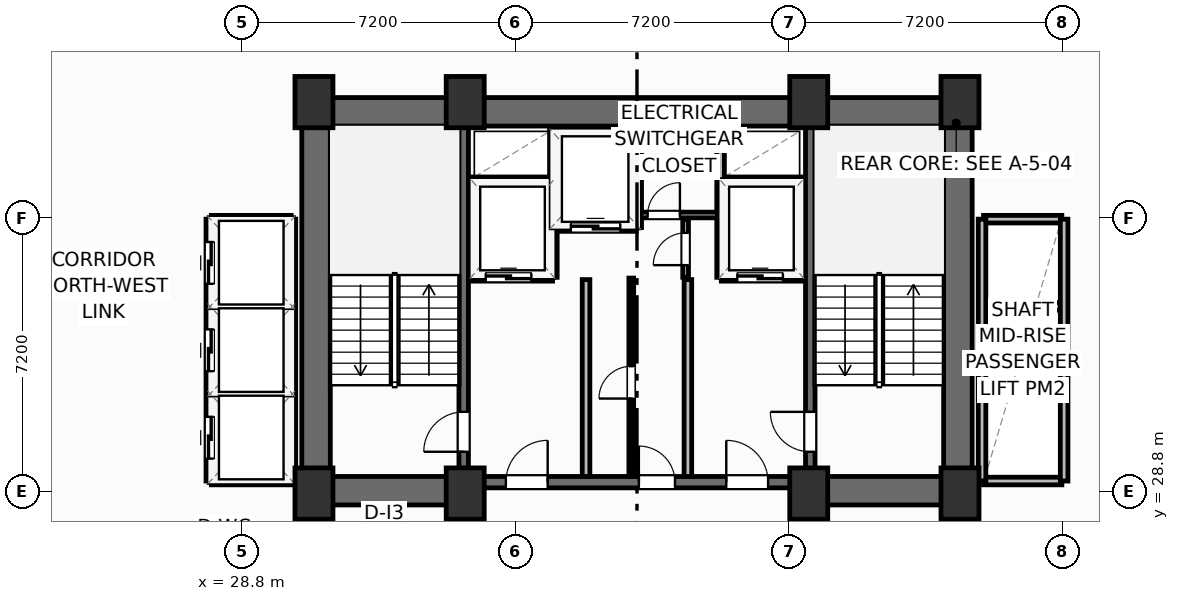
"""IFC4 building model, lengths in metres.
Left out: names, types, materials, properties, quantities, classifications, styles, units other than length and angle.
Written with IfcOpenShell. Run it as: python <this file> out.ifc"""

import sys

from ifc_helpers import new_model, si_unit, direction, frame, frame_2d, origin, origin_2d, place, context, subcontext, project, spatial, rectangle, extrude, element, fill, save


model = new_model("IFC4")
c1 = context("Model", 3, precision=1e-05, world=origin(), true_north=direction((0.0, 1.0)))
c2 = subcontext(c1, "Body", "Model", "MODEL_VIEW")
j1 = project(units=[si_unit("LENGTHUNIT", "METRE"), si_unit("PLANEANGLEUNIT", "RADIAN")], contexts=[c1])
p1 = place(None, origin())
s1 = spatial("IfcSite", under=j1, at=p1, CompositionType="ELEMENT")
p2 = place(p1, origin())
s2 = spatial("IfcBuilding", under=s1, at=p2, CompositionType="ELEMENT")
p3 = place(p2, frame((0.0, 0.0, 79.9)))
s3 = spatial("IfcBuildingStorey", under=s2, at=p3, CompositionType="ELEMENT", Elevation=79.9)
for number, where, z_axis, x_axis in (
    (1, (30.7, 28.75, 0.0), (0.0, 0.0, 1.0), (1.0, 0.0, 0.0)),
    (2, (34.68, 28.75, 0.0), (0.0, 0.0, 1.0), (1.0, 0.0, 0.0)),
    (3, (43.72, 28.75, 0.0), (0.0, 0.0, 1.0), (1.0, 0.0, 0.0)),
    (4, (47.7, 28.75, 0.0), (0.0, 0.0, 1.0), (1.0, 0.0, 0.0)),
    (5, (30.7, 39.05, 0.0), (0.0, 0.0, 1.0), (1.0, 0.0, 0.0)),
    (6, (34.68, 39.05, 0.0), (0.0, 0.0, 1.0), (1.0, 0.0, 0.0)),
    (7, (43.72, 39.05, 0.0), (0.0, 0.0, 1.0), (1.0, 0.0, 0.0)),
    (8, (47.7, 39.05, 0.0), (0.0, 0.0, 1.0), (1.0, 0.0, 0.0)),
):
    element("IfcColumn", number, at=place(p3, frame(where, z_axis=z_axis, x_axis=x_axis)), inside=s3, PredefinedType="COLUMN", context=c2, shape_type="SweptSolid", body=[
        extrude(rectangle(XDim=1.0, YDim=1.35, at=origin_2d()), origin(), (0.0, 0.0, 1.0), 3.7),
    ])
p4 = place(p3, frame((30.38, 38.795, 0.0), z_axis=(0.0, 0.0, 1.0), x_axis=(1.0, 0.0, 0.0)))
e9 = element("IfcWall", 9, at=p4, inside=s3, PredefinedType="SHEAR", context=c2, shape_type="SweptSolid", body=[
    extrude(rectangle(XDim=17.64, YDim=0.75, at=frame_2d((8.82, 0.0))), origin(), (0.0, 0.0, 1.0), 3.45),
])
for number, where, z_axis, x_axis in (
    (10, (30.755, 29.2, 0.0), (0.0, 0.0, 1.0), (0.0, 1.0, 0.0)),
    (11, (47.645, 29.2, 0.0), (0.0, 0.0, 1.0), (0.0, 1.0, 0.0)),
):
    element("IfcWall", number, at=place(p3, frame(where, z_axis=z_axis, x_axis=x_axis)), inside=s3, PredefinedType="SHEAR", context=c2, shape_type="SweptSolid", body=[
        extrude(rectangle(XDim=9.22, YDim=0.75, at=frame_2d((4.61, 0.0))), origin(), (0.0, 0.0, 1.0), 3.45),
    ])
p5 = place(p3, frame((30.38, 28.825, 0.0), z_axis=(0.0, 0.0, 1.0), x_axis=(1.0, 0.0, 0.0)))
e12 = element("IfcWall", 12, at=p5, inside=s3, PredefinedType="SHEAR", context=c2, shape_type="SweptSolid", body=[
    extrude(rectangle(XDim=4.42, YDim=0.75, at=frame_2d((2.21, 0.0))), origin(), (0.0, 0.0, 1.0), 3.45),
])
p6 = place(p3, frame((43.6, 28.825, 0.0), z_axis=(0.0, 0.0, 1.0), x_axis=(1.0, 0.0, 0.0)))
e13 = element("IfcWall", 13, at=p6, inside=s3, PredefinedType="SHEAR", context=c2, shape_type="SweptSolid", body=[
    extrude(rectangle(XDim=4.42, YDim=0.75, at=frame_2d((2.21, 0.0))), origin(), (0.0, 0.0, 1.0), 3.45),
])
p7 = place(p3, frame((34.8, 29.05, 0.0), z_axis=(0.0, 0.0, 1.0), x_axis=(1.0, 0.0, 0.0)))
e14 = element("IfcWall", 14, at=p7, inside=s3, PredefinedType="SHEAR", context=c2, shape_type="SweptSolid", body=[
    extrude(rectangle(XDim=8.8, YDim=0.3, at=frame_2d((4.4, 0.0))), origin(), (0.0, 0.0, 1.0), 3.45),
])
p8 = place(p7, frame((0.95, 0.0, 0.0)))
e15 = element("IfcOpeningElement", 15, at=p8, cuts=e14, PredefinedType="OPENING", context=c2, shape_type="SweptSolid", body=[
    extrude(rectangle(XDim=1.1, YDim=2.15, at=frame_2d((0.55, 1.075))), frame((0.0, 0.16, 0.0), z_axis=(0.0, -1.0, 0.0), x_axis=(1.0, 0.0, 0.0)), (0.0, 0.0, 1.0), 0.32),
])
p9 = place(p7, frame((6.75, 0.0, 0.0)))
e16 = element("IfcOpeningElement", 16, at=p9, cuts=e14, PredefinedType="OPENING", context=c2, shape_type="SweptSolid", body=[
    extrude(rectangle(XDim=1.1, YDim=2.15, at=frame_2d((0.55, 1.075))), frame((0.0, 0.16, 0.0), z_axis=(0.0, -1.0, 0.0), x_axis=(1.0, 0.0, 0.0)), (0.0, 0.0, 1.0), 0.32),
])
p10 = place(p7, frame((4.45, 0.0, 0.0)))
e17 = element("IfcOpeningElement", 17, at=p10, cuts=e14, PredefinedType="OPENING", context=c2, shape_type="SweptSolid", body=[
    extrude(rectangle(XDim=0.95, YDim=2.15, at=frame_2d((0.475, 1.075))), frame((0.0, 0.16, 0.0), z_axis=(0.0, -1.0, 0.0), x_axis=(1.0, 0.0, 0.0)), (0.0, 0.0, 1.0), 0.32),
])
p11 = place(p3, frame((34.64, 29.2, 0.0), z_axis=(0.0, 0.0, 1.0), x_axis=(0.0, 1.0, 0.0)))
e18 = element("IfcWall", 18, at=p11, inside=s3, PredefinedType="SHEAR", context=c2, shape_type="SweptSolid", body=[
    extrude(rectangle(XDim=9.22, YDim=0.25, at=frame_2d((4.61, 0.0))), origin(), (0.0, 0.0, 1.0), 3.45),
])
p12 = place(p11, frame((0.65, 0.0, 0.0)))
e19 = element("IfcOpeningElement", 19, at=p12, cuts=e18, PredefinedType="OPENING", context=c2, shape_type="SweptSolid", body=[
    extrude(rectangle(XDim=1.05, YDim=2.15, at=frame_2d((0.525, 1.075))), frame((0.0, 0.135, 0.0), z_axis=(0.0, -1.0, 0.0), x_axis=(1.0, 0.0, 0.0)), (0.0, 0.0, 1.0), 0.27),
])
p13 = place(p3, frame((43.76, 29.2, 0.0), z_axis=(0.0, 0.0, 1.0), x_axis=(0.0, 1.0, 0.0)))
e20 = element("IfcWall", 20, at=p13, inside=s3, PredefinedType="SHEAR", context=c2, shape_type="SweptSolid", body=[
    extrude(rectangle(XDim=9.22, YDim=0.25, at=frame_2d((4.61, 0.0))), origin(), (0.0, 0.0, 1.0), 3.45),
])
p14 = place(p13, frame((0.65, 0.0, 0.0)))
e21 = element("IfcOpeningElement", 21, at=p14, cuts=e20, PredefinedType="OPENING", context=c2, shape_type="SweptSolid", body=[
    extrude(rectangle(XDim=1.05, YDim=2.15, at=frame_2d((0.525, 1.075))), frame((0.0, 0.135, 0.0), z_axis=(0.0, -1.0, 0.0), x_axis=(1.0, 0.0, 0.0)), (0.0, 0.0, 1.0), 0.27),
])
for number, where, z_axis, x_axis in (
    (22, (37.86, 29.2, 0.0), (0.0, 0.0, 1.0), (0.0, 1.0, 0.0)),
    (23, (40.54, 29.2, 0.0), (0.0, 0.0, 1.0), (0.0, 1.0, 0.0)),
):
    element("IfcWall", number, at=place(p3, frame(where, z_axis=z_axis, x_axis=x_axis)), inside=s3, PredefinedType="PARTITIONING", context=c2, shape_type="SweptSolid", body=[
        extrude(rectangle(XDim=5.18, YDim=0.2, at=frame_2d((2.59, 0.0))), origin(), (0.0, 0.0, 1.0), 3.45),
    ])
p15 = place(p3, frame((34.8, 34.44, 0.0), z_axis=(0.0, 0.0, 1.0), x_axis=(1.0, 0.0, 0.0)))
e24 = element("IfcWall", 24, at=p15, inside=s3, PredefinedType="PARTITIONING", context=c2, shape_type="SweptSolid", body=[
    extrude(rectangle(XDim=2.18, YDim=0.2, at=frame_2d((1.09, 0.0))), origin(), (0.0, 0.0, 1.0), 3.45),
])
p16 = place(p15, frame((0.42, 0.0, 0.0)))
e25 = element("IfcOpeningElement", 25, at=p16, cuts=e24, PredefinedType="OPENING", context=c2, shape_type="SweptSolid", body=[
    extrude(rectangle(XDim=1.2, YDim=2.2, at=frame_2d((0.6, 1.1))), frame((0.0, 0.11, 0.0), z_axis=(0.0, -1.0, 0.0), x_axis=(1.0, 0.0, 0.0)), (0.0, 0.0, 1.0), 0.22),
])
p17 = place(p3, frame((34.8, 36.98, 0.0), z_axis=(0.0, 0.0, 1.0), x_axis=(1.0, 0.0, 0.0)))
e26 = element("IfcWall", 26, at=p17, inside=s3, PredefinedType="PARTITIONING", context=c2, shape_type="SweptSolid", body=[
    extrude(rectangle(XDim=2.18, YDim=0.2, at=frame_2d((1.09, 0.0))), origin(), (0.0, 0.0, 1.0), 3.45),
])
p18 = place(p3, frame((37.0, 34.44, 0.0), z_axis=(0.0, 0.0, 1.0), x_axis=(0.0, 1.0, 0.0)))
e27 = element("IfcWall", 27, at=p18, inside=s3, PredefinedType="PARTITIONING", context=c2, shape_type="SweptSolid", body=[
    extrude(rectangle(XDim=3.9, YDim=0.2, at=frame_2d((1.95, 0.0))), origin(), (0.0, 0.0, 1.0), 3.45),
])
p19 = place(p3, frame((41.42, 34.44, 0.0), z_axis=(0.0, 0.0, 1.0), x_axis=(1.0, 0.0, 0.0)))
e28 = element("IfcWall", 28, at=p19, inside=s3, PredefinedType="PARTITIONING", context=c2, shape_type="SweptSolid", body=[
    extrude(rectangle(XDim=2.18, YDim=0.2, at=frame_2d((1.09, 0.0))), origin(), (0.0, 0.0, 1.0), 3.45),
])
p20 = place(p19, frame((0.42, 0.0, 0.0)))
e29 = element("IfcOpeningElement", 29, at=p20, cuts=e28, PredefinedType="OPENING", context=c2, shape_type="SweptSolid", body=[
    extrude(rectangle(XDim=1.2, YDim=2.2, at=frame_2d((0.6, 1.1))), frame((0.0, 0.11, 0.0), z_axis=(0.0, -1.0, 0.0), x_axis=(1.0, 0.0, 0.0)), (0.0, 0.0, 1.0), 0.22),
])
p21 = place(p3, frame((41.42, 36.98, 0.0), z_axis=(0.0, 0.0, 1.0), x_axis=(1.0, 0.0, 0.0)))
e30 = element("IfcWall", 30, at=p21, inside=s3, PredefinedType="PARTITIONING", context=c2, shape_type="SweptSolid", body=[
    extrude(rectangle(XDim=2.18, YDim=0.2, at=frame_2d((1.09, 0.0))), origin(), (0.0, 0.0, 1.0), 3.45),
])
p22 = place(p3, frame((41.4, 34.44, 0.0), z_axis=(0.0, 0.0, 1.0), x_axis=(0.0, 1.0, 0.0)))
e31 = element("IfcWall", 31, at=p22, inside=s3, PredefinedType="PARTITIONING", context=c2, shape_type="SweptSolid", body=[
    extrude(rectangle(XDim=3.9, YDim=0.2, at=frame_2d((1.95, 0.0))), origin(), (0.0, 0.0, 1.0), 3.45),
])
p23 = place(p3, frame((37.06, 35.75, 0.0), z_axis=(0.0, 0.0, 1.0), x_axis=(1.0, 0.0, 0.0)))
e32 = element("IfcWall", 32, at=p23, inside=s3, PredefinedType="PARTITIONING", context=c2, shape_type="SweptSolid", body=[
    extrude(rectangle(XDim=2.12, YDim=0.2, at=frame_2d((1.06, 0.0))), origin(), (0.0, 0.0, 1.0), 3.45),
])
p24 = place(p23, frame((0.4, 0.0, 0.0)))
e33 = element("IfcOpeningElement", 33, at=p24, cuts=e32, PredefinedType="OPENING", context=c2, shape_type="SweptSolid", body=[
    extrude(rectangle(XDim=1.3, YDim=2.2, at=frame_2d((0.65, 1.1))), frame((0.0, 0.11, 0.0), z_axis=(0.0, -1.0, 0.0), x_axis=(1.0, 0.0, 0.0)), (0.0, 0.0, 1.0), 0.22),
])
p25 = place(p3, frame((39.22, 35.75, 0.0), z_axis=(0.0, 0.0, 1.0), x_axis=(0.0, 1.0, 0.0)))
e34 = element("IfcWall", 34, at=p25, inside=s3, PredefinedType="PARTITIONING", context=c2, shape_type="SweptSolid", body=[
    extrude(rectangle(XDim=2.59, YDim=0.2, at=frame_2d((1.295, 0.0))), origin(), (0.0, 0.0, 1.0), 3.45),
])
p26 = place(p3, frame((39.3, 36.08, 0.0), z_axis=(0.0, 0.0, 1.0), x_axis=(1.0, 0.0, 0.0)))
e35 = element("IfcWall", 35, at=p26, inside=s3, PredefinedType="PARTITIONING", context=c2, shape_type="SweptSolid", body=[
    extrude(rectangle(XDim=2.02, YDim=0.15, at=frame_2d((1.01, 0.0))), origin(), (0.0, 0.0, 1.0), 3.45),
])
p27 = place(p26, frame((0.18, 0.0, 0.0)))
e36 = element("IfcOpeningElement", 36, at=p27, cuts=e35, PredefinedType="OPENING", context=c2, shape_type="SweptSolid", body=[
    extrude(rectangle(XDim=0.85, YDim=2.05, at=frame_2d((0.425, 1.025))), frame((0.0, 0.085, 0.0), z_axis=(0.0, -1.0, 0.0), x_axis=(1.0, 0.0, 0.0)), (0.0, 0.0, 1.0), 0.17),
])
p28 = place(p3, frame((40.48, 34.44, 0.0), z_axis=(0.0, 0.0, 1.0), x_axis=(0.0, 1.0, 0.0)))
e37 = element("IfcWall", 37, at=p28, inside=s3, PredefinedType="PARTITIONING", context=c2, shape_type="SweptSolid", body=[
    extrude(rectangle(XDim=1.52, YDim=0.15, at=frame_2d((0.76, 0.0))), origin(), (0.0, 0.0, 1.0), 3.45),
])
p29 = place(p28, frame((0.32, 0.0, 0.0)))
e38 = element("IfcOpeningElement", 38, at=p29, cuts=e37, PredefinedType="OPENING", context=c2, shape_type="SweptSolid", body=[
    extrude(rectangle(XDim=0.85, YDim=2.05, at=frame_2d((0.425, 1.025))), frame((0.0, 0.085, 0.0), z_axis=(0.0, -1.0, 0.0), x_axis=(1.0, 0.0, 0.0)), (0.0, 0.0, 1.0), 0.17),
])
p30 = place(p3, frame((39.05, 29.2, 0.0), z_axis=(0.0, 0.0, 1.0), x_axis=(0.0, 1.0, 0.0)))
e39 = element("IfcWall", 39, at=p30, inside=s3, PredefinedType="PARTITIONING", context=c2, shape_type="SweptSolid", body=[
    extrude(rectangle(XDim=5.22, YDim=0.125, at=frame_2d((2.61, 0.0))), origin(), (0.0, 0.0, 1.0), 3.45),
])
p31 = place(p30, frame((2.05, 0.0, 0.0)))
e40 = element("IfcOpeningElement", 40, at=p31, cuts=e39, PredefinedType="OPENING", context=c2, shape_type="SweptSolid", body=[
    extrude(rectangle(XDim=0.85, YDim=2.05, at=frame_2d((0.425, 1.025))), frame((0.0, 0.073, 0.0), z_axis=(0.0, -1.0, 0.0), x_axis=(1.0, 0.0, 0.0)), (0.0, 0.0, 1.0), 0.145),
])
for number, where, z_axis, x_axis in (
    (41, (28.02, 31.375, 0.0), (0.0, 0.0, 1.0), (1.0, 0.0, 0.0)),
    (42, (28.02, 33.675, 0.0), (0.0, 0.0, 1.0), (1.0, 0.0, 0.0)),
):
    element("IfcWall", number, at=place(p3, frame(where, z_axis=z_axis, x_axis=x_axis)), inside=s3, PredefinedType="PARTITIONING", context=c2, shape_type="SweptSolid", body=[
        extrude(rectangle(XDim=2.06, YDim=0.2, at=frame_2d((1.03, 0.0))), origin(), (0.0, 0.0, 1.0), 3.45),
    ])
for number, where, z_axis, x_axis in (
    (43, (28.0, 29.08, 0.0), (0.0, 0.0, 1.0), (1.0, 0.0, 0.0)),
    (44, (28.0, 35.97, 0.0), (0.0, 0.0, 1.0), (1.0, 0.0, 0.0)),
):
    element("IfcWall", number, at=place(p3, frame(where, z_axis=z_axis, x_axis=x_axis)), inside=s3, PredefinedType="PARTITIONING", context=c2, shape_type="SweptSolid", body=[
        extrude(rectangle(XDim=2.1, YDim=0.2, at=frame_2d((1.05, 0.0))), origin(), (0.0, 0.0, 1.0), 3.45),
    ])
p32 = place(p3, frame((30.12, 29.08, 0.0), z_axis=(0.0, 0.0, 1.0), x_axis=(0.0, 1.0, 0.0)))
e45 = element("IfcWall", 45, at=p32, inside=s3, PredefinedType="PARTITIONING", context=c2, shape_type="SweptSolid", body=[
    extrude(rectangle(XDim=6.89, YDim=0.2, at=frame_2d((3.445, 0.0))), origin(), (0.0, 0.0, 1.0), 3.45),
])
p33 = place(p3, frame((27.96, 29.08, 0.0), z_axis=(0.0, 0.0, 1.0), x_axis=(0.0, 1.0, 0.0)))
e46 = element("IfcWall", 46, at=p33, inside=s3, PredefinedType="PARTITIONING", context=c2, shape_type="SweptSolid", body=[
    extrude(rectangle(XDim=6.89, YDim=0.2, at=frame_2d((3.445, 0.0))), origin(), (0.0, 0.0, 1.0), 3.45),
])
p34 = place(p33, frame((0.59, 0.0, 0.0)))
e47 = element("IfcOpeningElement", 47, at=p34, cuts=e46, PredefinedType="OPENING", context=c2, shape_type="SweptSolid", body=[
    extrude(rectangle(XDim=1.1, YDim=2.15, at=frame_2d((0.55, 1.075))), frame((0.0, 0.11, 0.0), z_axis=(0.0, -1.0, 0.0), x_axis=(1.0, 0.0, 0.0)), (0.0, 0.0, 1.0), 0.22),
])
p35 = place(p33, frame((2.89, 0.0, 0.0)))
e48 = element("IfcOpeningElement", 48, at=p35, cuts=e46, PredefinedType="OPENING", context=c2, shape_type="SweptSolid", body=[
    extrude(rectangle(XDim=1.1, YDim=2.15, at=frame_2d((0.55, 1.075))), frame((0.0, 0.11, 0.0), z_axis=(0.0, -1.0, 0.0), x_axis=(1.0, 0.0, 0.0)), (0.0, 0.0, 1.0), 0.22),
])
p36 = place(p33, frame((5.19, 0.0, 0.0)))
e49 = element("IfcOpeningElement", 49, at=p36, cuts=e46, PredefinedType="OPENING", context=c2, shape_type="SweptSolid", body=[
    extrude(rectangle(XDim=1.1, YDim=2.15, at=frame_2d((0.55, 1.075))), frame((0.0, 0.11, 0.0), z_axis=(0.0, -1.0, 0.0), x_axis=(1.0, 0.0, 0.0)), (0.0, 0.0, 1.0), 0.22),
])
for number, where, z_axis, x_axis in (
    (50, (48.32, 31.375, 0.0), (0.0, 0.0, 1.0), (1.0, 0.0, 0.0)),
    (51, (48.32, 33.675, 0.0), (0.0, 0.0, 1.0), (1.0, 0.0, 0.0)),
):
    element("IfcWall", number, at=place(p3, frame(where, z_axis=z_axis, x_axis=x_axis)), inside=s3, PredefinedType="PARTITIONING", context=c2, shape_type="SweptSolid", body=[
        extrude(rectangle(XDim=2.06, YDim=0.2, at=frame_2d((1.03, 0.0))), origin(), (0.0, 0.0, 1.0), 3.45),
    ])
p37 = place(p3, frame((48.32, 29.08, 0.0), z_axis=(0.0, 0.0, 1.0), x_axis=(1.0, 0.0, 0.0)))
e52 = element("IfcWall", 52, at=p37, inside=s3, PredefinedType="PARTITIONING", context=c2, shape_type="SweptSolid", body=[
    extrude(rectangle(XDim=2.06, YDim=0.2, at=frame_2d((1.03, 0.0))), origin(), (0.0, 0.0, 1.0), 2.662),
])
p38 = place(p3, frame((48.32, 35.97, 0.0), z_axis=(0.0, 0.0, 1.0), x_axis=(1.0, 0.0, 0.0)))
e53 = element("IfcWall", 53, at=p38, inside=s3, PredefinedType="PARTITIONING", context=c2, shape_type="SweptSolid", body=[
    extrude(rectangle(XDim=2.06, YDim=0.2, at=frame_2d((1.03, 0.0))), origin(), (0.0, 0.0, 1.0), 3.45),
])
for number, where, z_axis, x_axis in (
    (54, (48.28, 29.08, 0.0), (0.0, 0.0, 1.0), (0.0, 1.0, 0.0)),
    (55, (50.44, 29.08, 0.0), (0.0, 0.0, 1.0), (0.0, 1.0, 0.0)),
):
    element("IfcWall", number, at=place(p3, frame(where, z_axis=z_axis, x_axis=x_axis)), inside=s3, PredefinedType="PARTITIONING", context=c2, shape_type="SweptSolid", body=[
        extrude(rectangle(XDim=6.89, YDim=0.2, at=frame_2d((3.445, 0.0))), origin(), (0.0, 0.0, 1.0), 3.45),
    ])
p39 = place(p12, origin())
e56 = element("IfcDoor", 56, at=p39, inside=s3, OperationType="SINGLE_SWING_LEFT", PredefinedType="DOOR", context=c2, shape_type="SweptSolid", body=[
    extrude(rectangle(XDim=1.05, YDim=2.15, at=frame_2d((0.525, 1.075))), frame((0.0, 0.025, 0.0), z_axis=(0.0, -1.0, 0.0), x_axis=(1.0, 0.0, 0.0)), (0.0, 0.0, 1.0), 0.05),
])
fill(e19, e56)
p40 = place(p14, origin())
e57 = element("IfcDoor", 57, at=p40, inside=s3, OperationType="SINGLE_SWING_RIGHT", PredefinedType="DOOR", context=c2, shape_type="SweptSolid", body=[
    extrude(rectangle(XDim=1.05, YDim=2.15, at=frame_2d((0.525, 1.075))), frame((0.0, 0.025, 0.0), z_axis=(0.0, -1.0, 0.0), x_axis=(1.0, 0.0, 0.0)), (0.0, 0.0, 1.0), 0.05),
])
fill(e21, e57)
p41 = place(p8, origin())
e58 = element("IfcDoor", 58, at=p41, inside=s3, OperationType="SINGLE_SWING_RIGHT", PredefinedType="DOOR", context=c2, shape_type="SweptSolid", body=[
    extrude(rectangle(XDim=1.1, YDim=2.15, at=frame_2d((0.55, 1.075))), frame((0.0, 0.025, 0.0), z_axis=(0.0, -1.0, 0.0), x_axis=(1.0, 0.0, 0.0)), (0.0, 0.0, 1.0), 0.05),
])
fill(e15, e58)
p42 = place(p9, origin())
e59 = element("IfcDoor", 59, at=p42, inside=s3, OperationType="SINGLE_SWING_LEFT", PredefinedType="DOOR", context=c2, shape_type="SweptSolid", body=[
    extrude(rectangle(XDim=1.1, YDim=2.15, at=frame_2d((0.55, 1.075))), frame((0.0, 0.025, 0.0), z_axis=(0.0, -1.0, 0.0), x_axis=(1.0, 0.0, 0.0)), (0.0, 0.0, 1.0), 0.05),
])
fill(e16, e59)
p43 = place(p16, origin())
e60 = element("IfcDoor", 60, at=p43, inside=s3, OperationType="SLIDING_TO_LEFT", PredefinedType="DOOR", context=c2, shape_type="SweptSolid", body=[
    extrude(rectangle(XDim=1.2, YDim=2.2, at=frame_2d((0.6, 1.1))), frame((0.0, 0.025, 0.0), z_axis=(0.0, -1.0, 0.0), x_axis=(1.0, 0.0, 0.0)), (0.0, 0.0, 1.0), 0.05),
])
fill(e25, e60)
p44 = place(p20, origin())
e61 = element("IfcDoor", 61, at=p44, inside=s3, OperationType="SLIDING_TO_LEFT", PredefinedType="DOOR", context=c2, shape_type="SweptSolid", body=[
    extrude(rectangle(XDim=1.2, YDim=2.2, at=frame_2d((0.6, 1.1))), frame((0.0, 0.025, 0.0), z_axis=(0.0, -1.0, 0.0), x_axis=(1.0, 0.0, 0.0)), (0.0, 0.0, 1.0), 0.05),
])
fill(e29, e61)
p45 = place(p24, origin())
e62 = element("IfcDoor", 62, at=p45, inside=s3, OperationType="SLIDING_TO_LEFT", PredefinedType="DOOR", context=c2, shape_type="SweptSolid", body=[
    extrude(rectangle(XDim=1.3, YDim=2.2, at=frame_2d((0.65, 1.1))), frame((0.0, 0.025, 0.0), z_axis=(0.0, -1.0, 0.0), x_axis=(1.0, 0.0, 0.0)), (0.0, 0.0, 1.0), 0.05),
])
fill(e33, e62)
p46 = place(p27, origin())
e63 = element("IfcDoor", 63, at=p46, inside=s3, OperationType="SINGLE_SWING_RIGHT", PredefinedType="DOOR", context=c2, shape_type="SweptSolid", body=[
    extrude(rectangle(XDim=0.85, YDim=2.05, at=frame_2d((0.425, 1.025))), frame((0.0, 0.025, 0.0), z_axis=(0.0, -1.0, 0.0), x_axis=(1.0, 0.0, 0.0)), (0.0, 0.0, 1.0), 0.05),
])
fill(e36, e63)
p47 = place(p29, origin())
e64 = element("IfcDoor", 64, at=p47, inside=s3, OperationType="SINGLE_SWING_LEFT", PredefinedType="DOOR", context=c2, shape_type="SweptSolid", body=[
    extrude(rectangle(XDim=0.85, YDim=2.05, at=frame_2d((0.425, 1.025))), frame((0.0, 0.025, 0.0), z_axis=(0.0, -1.0, 0.0), x_axis=(1.0, 0.0, 0.0)), (0.0, 0.0, 1.0), 0.05),
])
fill(e38, e64)
p48 = place(p31, origin())
e65 = element("IfcDoor", 65, at=p48, inside=s3, OperationType="SINGLE_SWING_LEFT", PredefinedType="DOOR", context=c2, shape_type="SweptSolid", body=[
    extrude(rectangle(XDim=0.85, YDim=2.05, at=frame_2d((0.425, 1.025))), frame((0.0, 0.025, 0.0), z_axis=(0.0, -1.0, 0.0), x_axis=(1.0, 0.0, 0.0)), (0.0, 0.0, 1.0), 0.05),
])
fill(e40, e65)
p49 = place(p10, origin())
e66 = element("IfcDoor", 66, at=p49, inside=s3, OperationType="SINGLE_SWING_LEFT", PredefinedType="DOOR", context=c2, shape_type="SweptSolid", body=[
    extrude(rectangle(XDim=0.95, YDim=2.15, at=frame_2d((0.475, 1.075))), frame((0.0, 0.025, 0.0), z_axis=(0.0, -1.0, 0.0), x_axis=(1.0, 0.0, 0.0)), (0.0, 0.0, 1.0), 0.05),
])
fill(e17, e66)
p50 = place(p34, origin())
e67 = element("IfcDoor", 67, at=p50, inside=s3, OperationType="SLIDING_TO_LEFT", PredefinedType="DOOR", context=c2, shape_type="SweptSolid", body=[
    extrude(rectangle(XDim=1.1, YDim=2.15, at=frame_2d((0.55, 1.075))), frame((0.0, 0.025, 0.0), z_axis=(0.0, -1.0, 0.0), x_axis=(1.0, 0.0, 0.0)), (0.0, 0.0, 1.0), 0.05),
])
fill(e47, e67)
p51 = place(p35, origin())
e68 = element("IfcDoor", 68, at=p51, inside=s3, OperationType="SLIDING_TO_LEFT", PredefinedType="DOOR", context=c2, shape_type="SweptSolid", body=[
    extrude(rectangle(XDim=1.1, YDim=2.15, at=frame_2d((0.55, 1.075))), frame((0.0, 0.025, 0.0), z_axis=(0.0, -1.0, 0.0), x_axis=(1.0, 0.0, 0.0)), (0.0, 0.0, 1.0), 0.05),
])
fill(e48, e68)
p52 = place(p36, origin())
e69 = element("IfcDoor", 69, at=p52, inside=s3, OperationType="SLIDING_TO_LEFT", PredefinedType="DOOR", context=c2, shape_type="SweptSolid", body=[
    extrude(rectangle(XDim=1.1, YDim=2.15, at=frame_2d((0.55, 1.075))), frame((0.0, 0.025, 0.0), z_axis=(0.0, -1.0, 0.0), x_axis=(1.0, 0.0, 0.0)), (0.0, 0.0, 1.0), 0.05),
])
fill(e49, e69)
save(model, sys.argv[1])
